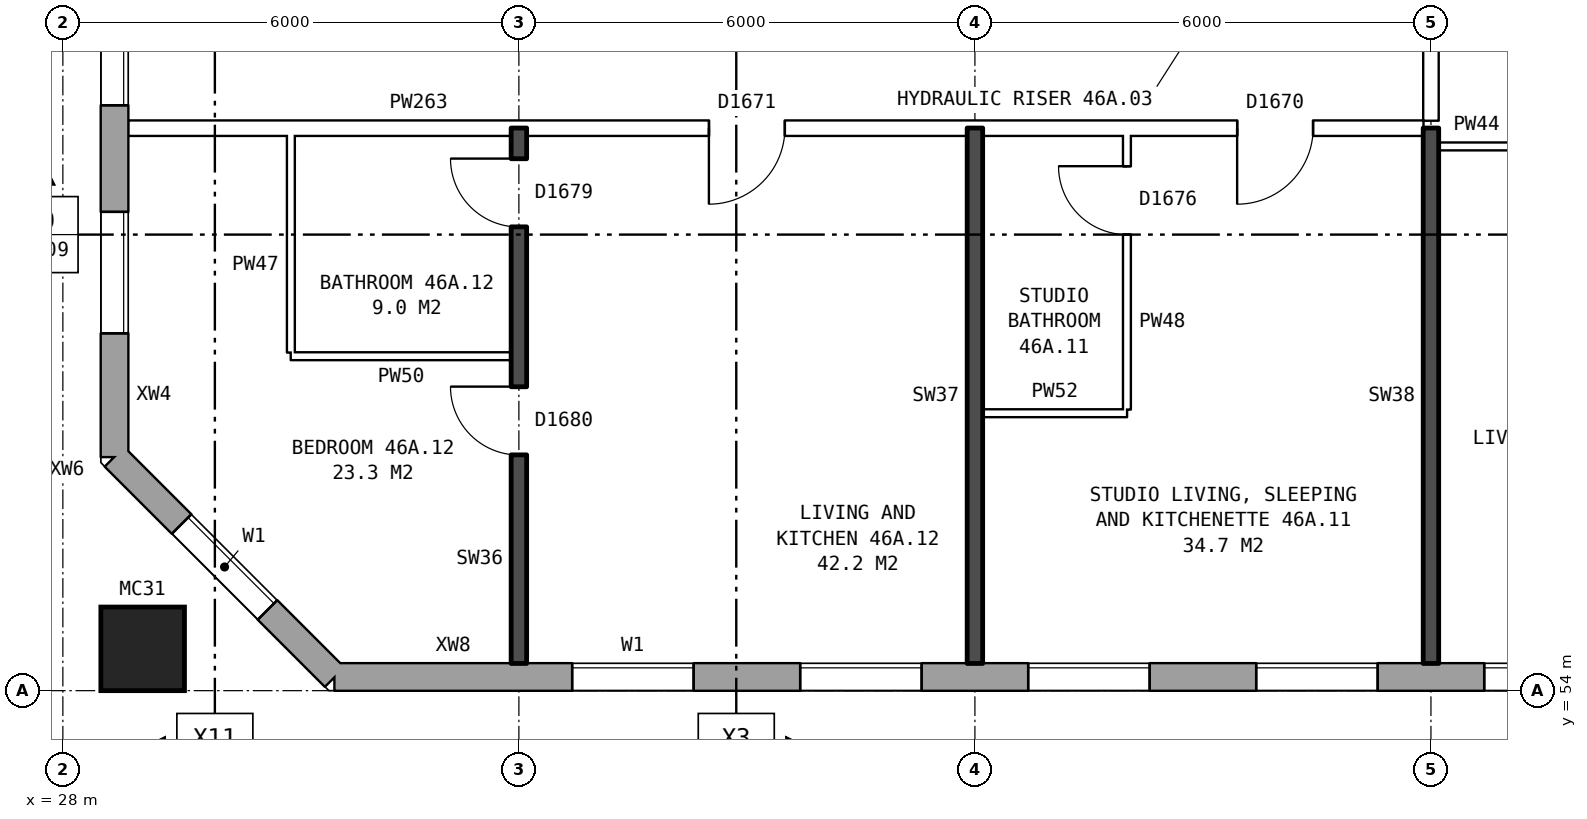
"""IFC4 building model, lengths in metres.
Left out: names, types, materials, properties, quantities, classifications, styles, units other than length and angle.
Written with IfcOpenShell. Run it as: python <this file> out.ifc"""

import sys

from ifc_helpers import new_model, si_unit, direction, frame, frame_2d, origin, origin_2d, place, context, subcontext, project, spatial, rectangle, hollow_rectangle, extrude, element, fill, save


model = new_model("IFC4")
c1 = context("Model", 3, precision=1e-05, world=origin(), true_north=direction((0.0, 1.0)))
c2 = subcontext(c1, "Body", "Model", "MODEL_VIEW")
j1 = project(units=[si_unit("LENGTHUNIT", "METRE"), si_unit("PLANEANGLEUNIT", "RADIAN")], contexts=[c1])
p1 = place(None, origin())
s1 = spatial("IfcSite", under=j1, at=p1, CompositionType="ELEMENT")
p2 = place(p1, origin())
s2 = spatial("IfcBuilding", under=s1, at=p2, CompositionType="ELEMENT")
p3 = place(p2, frame((0.0, 0.0, 164.0)))
s3 = spatial("IfcBuildingStorey", under=s2, at=p3, CompositionType="ELEMENT", Elevation=164.0)
p4 = place(p3, frame((29.05, 54.55, 0.0), z_axis=(0.0, 0.0, 1.0), x_axis=(1.0, 0.0, 0.0)))
e1 = element("IfcColumn", 1, at=p4, inside=s3, PredefinedType="COLUMN", context=c2, shape_type="SweptSolid", body=[
    extrude(hollow_rectangle(XDim=1.1, YDim=1.1, WallThickness=0.06, at=origin_2d()), origin(), (0.0, 0.0, 1.0), 3.1),
])
p5 = place(p3, frame((28.68, 57.075, 0.0), z_axis=(0.0, 0.0, 1.0), x_axis=(0.707106781187, -0.707106781187, 0.0)))
e2 = element("IfcWall", 2, at=p5, inside=s3, PredefinedType="STANDARD", context=c2, shape_type="SweptSolid", body=[
    extrude(rectangle(XDim=4.094, YDim=0.36, at=frame_2d((2.047, 0.0))), origin(), (0.0, 0.0, 1.0), 2.85),
])
p6 = place(p5, frame((1.247, 0.0, 0.8)))
e3 = element("IfcOpeningElement", 3, at=p6, cuts=e2, PredefinedType="OPENING", context=c2, shape_type="SweptSolid", body=[
    extrude(rectangle(XDim=1.6, YDim=1.8, at=frame_2d((0.8, 0.9))), frame((0.0, 0.19, 0.0), z_axis=(0.0, -1.0, 0.0), x_axis=(1.0, 0.0, 0.0)), (0.0, 0.0, 1.0), 0.38),
])
p7 = place(p3, frame((31.575, 54.18, 0.0), z_axis=(0.0, 0.0, 1.0), x_axis=(1.0, 0.0, 0.0)))
e4 = element("IfcWall", 4, at=p7, inside=s3, PredefinedType="STANDARD", context=c2, shape_type="SweptSolid", body=[
    extrude(rectangle(XDim=41.351, YDim=0.36, at=frame_2d((20.675, 0.0))), origin(), (0.0, 0.0, 1.0), 2.85),
])
p8 = place(p7, frame((3.125, 0.0, 0.8)))
e5 = element("IfcOpeningElement", 5, at=p8, cuts=e4, PredefinedType="OPENING", context=c2, shape_type="SweptSolid", body=[
    extrude(rectangle(XDim=1.6, YDim=1.8, at=frame_2d((0.8, 0.9))), frame((0.0, 0.19, 0.0), z_axis=(0.0, -1.0, 0.0), x_axis=(1.0, 0.0, 0.0)), (0.0, 0.0, 1.0), 0.38),
])
p9 = place(p7, frame((6.125, 0.0, 0.8)))
e6 = element("IfcOpeningElement", 6, at=p9, cuts=e4, PredefinedType="OPENING", context=c2, shape_type="SweptSolid", body=[
    extrude(rectangle(XDim=1.6, YDim=1.8, at=frame_2d((0.8, 0.9))), frame((0.0, 0.19, 0.0), z_axis=(0.0, -1.0, 0.0), x_axis=(1.0, 0.0, 0.0)), (0.0, 0.0, 1.0), 0.38),
])
p10 = place(p7, frame((9.125, 0.0, 0.8)))
e7 = element("IfcOpeningElement", 7, at=p10, cuts=e4, PredefinedType="OPENING", context=c2, shape_type="SweptSolid", body=[
    extrude(rectangle(XDim=1.6, YDim=1.8, at=frame_2d((0.8, 0.9))), frame((0.0, 0.19, 0.0), z_axis=(0.0, -1.0, 0.0), x_axis=(1.0, 0.0, 0.0)), (0.0, 0.0, 1.0), 0.38),
])
p11 = place(p7, frame((12.125, 0.0, 0.8)))
e8 = element("IfcOpeningElement", 8, at=p11, cuts=e4, PredefinedType="OPENING", context=c2, shape_type="SweptSolid", body=[
    extrude(rectangle(XDim=1.6, YDim=1.8, at=frame_2d((0.8, 0.9))), frame((0.0, 0.19, 0.0), z_axis=(0.0, -1.0, 0.0), x_axis=(1.0, 0.0, 0.0)), (0.0, 0.0, 1.0), 0.38),
])
p12 = place(p7, frame((15.125, 0.0, 0.8)))
e9 = element("IfcOpeningElement", 9, at=p12, cuts=e4, PredefinedType="OPENING", context=c2, shape_type="SweptSolid", body=[
    extrude(rectangle(XDim=1.6, YDim=1.8, at=frame_2d((0.8, 0.9))), frame((0.0, 0.19, 0.0), z_axis=(0.0, -1.0, 0.0), x_axis=(1.0, 0.0, 0.0)), (0.0, 0.0, 1.0), 0.38),
])
p13 = place(p7, frame((17.575, 0.0, 1.55)))
e10 = element("IfcOpeningElement", 10, at=p13, cuts=e4, PredefinedType="OPENING", context=c2, shape_type="SweptSolid", body=[
    extrude(rectangle(XDim=1.0, YDim=0.9, at=frame_2d((0.5, 0.45))), frame((0.0, 0.19, 0.0), z_axis=(0.0, -1.0, 0.0), x_axis=(1.0, 0.0, 0.0)), (0.0, 0.0, 1.0), 0.38),
])
p14 = place(p7, frame((20.625, 0.0, 0.25)))
e11 = element("IfcOpeningElement", 11, at=p14, cuts=e4, PredefinedType="OPENING", context=c2, shape_type="SweptSolid", body=[
    extrude(rectangle(XDim=0.6, YDim=1.5, at=frame_2d((0.3, 0.75))), frame((0.0, 0.19, 0.0), z_axis=(0.0, -1.0, 0.0), x_axis=(1.0, 0.0, 0.0)), (0.0, 0.0, 1.0), 0.38),
])
p15 = place(p7, frame((24.125, 0.0, 0.8)))
e12 = element("IfcOpeningElement", 12, at=p15, cuts=e4, PredefinedType="OPENING", context=c2, shape_type="SweptSolid", body=[
    extrude(rectangle(XDim=1.6, YDim=1.8, at=frame_2d((0.8, 0.9))), frame((0.0, 0.19, 0.0), z_axis=(0.0, -1.0, 0.0), x_axis=(1.0, 0.0, 0.0)), (0.0, 0.0, 1.0), 0.38),
])
p16 = place(p7, frame((27.125, 0.0, 0.8)))
e13 = element("IfcOpeningElement", 13, at=p16, cuts=e4, PredefinedType="OPENING", context=c2, shape_type="SweptSolid", body=[
    extrude(rectangle(XDim=1.6, YDim=1.8, at=frame_2d((0.8, 0.9))), frame((0.0, 0.19, 0.0), z_axis=(0.0, -1.0, 0.0), x_axis=(1.0, 0.0, 0.0)), (0.0, 0.0, 1.0), 0.38),
])
p17 = place(p7, frame((30.125, 0.0, 0.8)))
e14 = element("IfcOpeningElement", 14, at=p17, cuts=e4, PredefinedType="OPENING", context=c2, shape_type="SweptSolid", body=[
    extrude(rectangle(XDim=1.6, YDim=1.8, at=frame_2d((0.8, 0.9))), frame((0.0, 0.19, 0.0), z_axis=(0.0, -1.0, 0.0), x_axis=(1.0, 0.0, 0.0)), (0.0, 0.0, 1.0), 0.38),
])
p18 = place(p7, frame((33.125, 0.0, 0.8)))
e15 = element("IfcOpeningElement", 15, at=p18, cuts=e4, PredefinedType="OPENING", context=c2, shape_type="SweptSolid", body=[
    extrude(rectangle(XDim=1.6, YDim=1.8, at=frame_2d((0.8, 0.9))), frame((0.0, 0.19, 0.0), z_axis=(0.0, -1.0, 0.0), x_axis=(1.0, 0.0, 0.0)), (0.0, 0.0, 1.0), 0.38),
])
p19 = place(p7, frame((36.125, 0.0, 0.8)))
e16 = element("IfcOpeningElement", 16, at=p19, cuts=e4, PredefinedType="OPENING", context=c2, shape_type="SweptSolid", body=[
    extrude(rectangle(XDim=1.6, YDim=1.8, at=frame_2d((0.8, 0.9))), frame((0.0, 0.19, 0.0), z_axis=(0.0, -1.0, 0.0), x_axis=(1.0, 0.0, 0.0)), (0.0, 0.0, 1.0), 0.38),
])
p20 = place(p7, frame((39.125, 0.0, 0.8)))
e17 = element("IfcOpeningElement", 17, at=p20, cuts=e4, PredefinedType="OPENING", context=c2, shape_type="SweptSolid", body=[
    extrude(rectangle(XDim=1.6, YDim=1.8, at=frame_2d((0.8, 0.9))), frame((0.0, 0.19, 0.0), z_axis=(0.0, -1.0, 0.0), x_axis=(1.0, 0.0, 0.0)), (0.0, 0.0, 1.0), 0.38),
])
p21 = place(p7, frame((19.225, 0.0, 0.15)))
e18 = element("IfcOpeningElement", 18, at=p21, cuts=e4, PredefinedType="OPENING", context=c2, shape_type="SweptSolid", body=[
    extrude(rectangle(XDim=1.0, YDim=0.9, at=frame_2d((0.5, 0.45))), frame((0.0, 0.19, 0.0), z_axis=(0.0, -1.0, 0.0), x_axis=(1.0, 0.0, 0.0)), (0.0, 0.0, 1.0), 0.38),
])
p22 = place(p7, frame((21.525, 0.0, 0.15)))
e19 = element("IfcOpeningElement", 19, at=p22, cuts=e4, PredefinedType="OPENING", context=c2, shape_type="SweptSolid", body=[
    extrude(rectangle(XDim=0.6, YDim=0.9, at=frame_2d((0.3, 0.45))), frame((0.0, 0.19, 0.0), z_axis=(0.0, -1.0, 0.0), x_axis=(1.0, 0.0, 0.0)), (0.0, 0.0, 1.0), 0.38),
])
p23 = place(p7, frame((22.625, 0.0, 1.65)))
e20 = element("IfcOpeningElement", 20, at=p23, cuts=e4, PredefinedType="OPENING", context=c2, shape_type="SweptSolid", body=[
    extrude(rectangle(XDim=0.6, YDim=0.9, at=frame_2d((0.3, 0.45))), frame((0.0, 0.19, 0.0), z_axis=(0.0, -1.0, 0.0), x_axis=(1.0, 0.0, 0.0)), (0.0, 0.0, 1.0), 0.38),
])
p24 = place(p3, frame((28.68, 82.925, 0.0), z_axis=(0.0, 0.0, 1.0), x_axis=(0.0, -1.0, 0.0)))
e21 = element("IfcWall", 21, at=p24, inside=s3, PredefinedType="STANDARD", context=c2, shape_type="SweptSolid", body=[
    extrude(rectangle(XDim=25.851, YDim=0.36, at=frame_2d((12.925, 0.0))), origin(), (0.0, 0.0, 1.0), 2.85),
])
p25 = place(p24, frame((1.625, 0.0, 0.8)))
e22 = element("IfcOpeningElement", 22, at=p25, cuts=e21, PredefinedType="OPENING", context=c2, shape_type="SweptSolid", body=[
    extrude(rectangle(XDim=1.6, YDim=1.8, at=frame_2d((0.8, 0.9))), frame((0.0, 0.19, 0.0), z_axis=(0.0, -1.0, 0.0), x_axis=(1.0, 0.0, 0.0)), (0.0, 0.0, 1.0), 0.38),
])
p26 = place(p24, frame((4.625, 0.0, 0.8)))
e23 = element("IfcOpeningElement", 23, at=p26, cuts=e21, PredefinedType="OPENING", context=c2, shape_type="SweptSolid", body=[
    extrude(rectangle(XDim=1.6, YDim=1.8, at=frame_2d((0.8, 0.9))), frame((0.0, 0.19, 0.0), z_axis=(0.0, -1.0, 0.0), x_axis=(1.0, 0.0, 0.0)), (0.0, 0.0, 1.0), 0.38),
])
p27 = place(p24, frame((7.625, 0.0, 0.8)))
e24 = element("IfcOpeningElement", 24, at=p27, cuts=e21, PredefinedType="OPENING", context=c2, shape_type="SweptSolid", body=[
    extrude(rectangle(XDim=1.6, YDim=1.8, at=frame_2d((0.8, 0.9))), frame((0.0, 0.19, 0.0), z_axis=(0.0, -1.0, 0.0), x_axis=(1.0, 0.0, 0.0)), (0.0, 0.0, 1.0), 0.38),
])
p28 = place(p24, frame((10.625, 0.0, 0.8)))
e25 = element("IfcOpeningElement", 25, at=p28, cuts=e21, PredefinedType="OPENING", context=c2, shape_type="SweptSolid", body=[
    extrude(rectangle(XDim=1.6, YDim=1.8, at=frame_2d((0.8, 0.9))), frame((0.0, 0.19, 0.0), z_axis=(0.0, -1.0, 0.0), x_axis=(1.0, 0.0, 0.0)), (0.0, 0.0, 1.0), 0.38),
])
p29 = place(p24, frame((13.625, 0.0, 0.8)))
e26 = element("IfcOpeningElement", 26, at=p29, cuts=e21, PredefinedType="OPENING", context=c2, shape_type="SweptSolid", body=[
    extrude(rectangle(XDim=1.6, YDim=1.8, at=frame_2d((0.8, 0.9))), frame((0.0, 0.19, 0.0), z_axis=(0.0, -1.0, 0.0), x_axis=(1.0, 0.0, 0.0)), (0.0, 0.0, 1.0), 0.38),
])
p30 = place(p24, frame((16.625, 0.0, 0.8)))
e27 = element("IfcOpeningElement", 27, at=p30, cuts=e21, PredefinedType="OPENING", context=c2, shape_type="SweptSolid", body=[
    extrude(rectangle(XDim=1.6, YDim=1.8, at=frame_2d((0.8, 0.9))), frame((0.0, 0.19, 0.0), z_axis=(0.0, -1.0, 0.0), x_axis=(1.0, 0.0, 0.0)), (0.0, 0.0, 1.0), 0.38),
])
p31 = place(p24, frame((19.625, 0.0, 0.8)))
e28 = element("IfcOpeningElement", 28, at=p31, cuts=e21, PredefinedType="OPENING", context=c2, shape_type="SweptSolid", body=[
    extrude(rectangle(XDim=1.6, YDim=1.8, at=frame_2d((0.8, 0.9))), frame((0.0, 0.19, 0.0), z_axis=(0.0, -1.0, 0.0), x_axis=(1.0, 0.0, 0.0)), (0.0, 0.0, 1.0), 0.38),
])
p32 = place(p24, frame((22.625, 0.0, 0.8)))
e29 = element("IfcOpeningElement", 29, at=p32, cuts=e21, PredefinedType="OPENING", context=c2, shape_type="SweptSolid", body=[
    extrude(rectangle(XDim=1.6, YDim=1.8, at=frame_2d((0.8, 0.9))), frame((0.0, 0.19, 0.0), z_axis=(0.0, -1.0, 0.0), x_axis=(1.0, 0.0, 0.0)), (0.0, 0.0, 1.0), 0.38),
])
p33 = place(p3, frame((40.1, 57.65, 0.0), z_axis=(0.0, 0.0, 1.0), x_axis=(1.0, 0.0, 0.0)))
e30 = element("IfcWall", 30, at=p33, inside=s3, PredefinedType="PARTITIONING", context=c2, shape_type="SweptSolid", body=[
    extrude(rectangle(XDim=1.9, YDim=0.1, at=frame_2d((0.95, 0.0))), origin(), (0.0, 0.0, 1.0), 2.85),
])
p34 = place(p3, frame((31.0, 58.4, 0.0), z_axis=(0.0, 0.0, 1.0), x_axis=(1.0, 0.0, 0.0)))
e31 = element("IfcWall", 31, at=p34, inside=s3, PredefinedType="PARTITIONING", context=c2, shape_type="SweptSolid", body=[
    extrude(rectangle(XDim=2.9, YDim=0.1, at=frame_2d((1.45, 0.0))), origin(), (0.0, 0.0, 1.0), 2.85),
])
p35 = place(p3, frame((46.1, 61.16, 0.0), z_axis=(0.0, 0.0, 1.0), x_axis=(1.0, 0.0, 0.0)))
e32 = element("IfcWall", 32, at=p35, inside=s3, PredefinedType="PARTITIONING", context=c2, shape_type="SweptSolid", body=[
    extrude(rectangle(XDim=2.9, YDim=0.1, at=frame_2d((1.45, 0.0))), origin(), (0.0, 0.0, 1.0), 2.85),
])
p36 = place(p35, frame((1.0, 0.0, 0.0)))
e33 = element("IfcOpeningElement", 33, at=p36, cuts=e32, PredefinedType="OPENING", context=c2, shape_type="SweptSolid", body=[
    extrude(rectangle(XDim=0.9, YDim=2.1, at=frame_2d((0.45, 1.05))), frame((0.0, 0.06, 0.0), z_axis=(0.0, -1.0, 0.0), x_axis=(1.0, 0.0, 0.0)), (0.0, 0.0, 1.0), 0.12),
])
p37 = place(p3, frame((28.86, 61.4, 0.0), z_axis=(0.0, 0.0, 1.0), x_axis=(1.0, 0.0, 0.0)))
e34 = element("IfcWall", 34, at=p37, inside=s3, PredefinedType="PARTITIONING", context=c2, shape_type="SweptSolid", body=[
    extrude(rectangle(XDim=17.04, YDim=0.2, at=frame_2d((8.52, 0.0))), origin(), (0.0, 0.0, 1.0), 2.85),
])
p38 = place(p37, frame((14.59, 0.0, 0.0)))
e35 = element("IfcOpeningElement", 35, at=p38, cuts=e34, PredefinedType="OPENING", context=c2, shape_type="SweptSolid", body=[
    extrude(rectangle(XDim=1.0, YDim=2.1, at=frame_2d((0.5, 1.05))), frame((0.0, 0.11, 0.0), z_axis=(0.0, -1.0, 0.0), x_axis=(1.0, 0.0, 0.0)), (0.0, 0.0, 1.0), 0.22),
])
p39 = place(p37, frame((7.64, 0.0, 0.0)))
e36 = element("IfcOpeningElement", 36, at=p39, cuts=e34, PredefinedType="OPENING", context=c2, shape_type="SweptSolid", body=[
    extrude(rectangle(XDim=1.0, YDim=2.1, at=frame_2d((0.5, 1.05))), frame((0.0, 0.11, 0.0), z_axis=(0.0, -1.0, 0.0), x_axis=(1.0, 0.0, 0.0)), (0.0, 0.0, 1.0), 0.22),
])
p40 = place(p3, frame((31.0, 58.45, 0.0), z_axis=(0.0, 0.0, 1.0), x_axis=(0.0, 1.0, 0.0)))
e37 = element("IfcWall", 37, at=p40, inside=s3, PredefinedType="PARTITIONING", context=c2, shape_type="SweptSolid", body=[
    extrude(rectangle(XDim=2.85, YDim=0.1, at=frame_2d((1.425, 0.0))), origin(), (0.0, 0.0, 1.0), 2.85),
])
p41 = place(p3, frame((34.0, 54.36, 0.0), z_axis=(0.0, 0.0, 1.0), x_axis=(0.0, 1.0, 0.0)))
e38 = element("IfcWall", 38, at=p41, inside=s3, PredefinedType="SOLIDWALL", context=c2, shape_type="SweptSolid", body=[
    extrude(rectangle(XDim=7.04, YDim=0.2, at=frame_2d((3.52, 0.0))), origin(), (0.0, 0.0, 1.0), 2.85),
])
p42 = place(p41, frame((2.74, 0.0, 0.0)))
e39 = element("IfcOpeningElement", 39, at=p42, cuts=e38, PredefinedType="OPENING", context=c2, shape_type="SweptSolid", body=[
    extrude(rectangle(XDim=0.9, YDim=2.1, at=frame_2d((0.45, 1.05))), frame((0.0, 0.11, 0.0), z_axis=(0.0, -1.0, 0.0), x_axis=(1.0, 0.0, 0.0)), (0.0, 0.0, 1.0), 0.22),
])
p43 = place(p41, frame((5.74, 0.0, 0.0)))
e40 = element("IfcOpeningElement", 40, at=p43, cuts=e38, PredefinedType="OPENING", context=c2, shape_type="SweptSolid", body=[
    extrude(rectangle(XDim=0.9, YDim=2.1, at=frame_2d((0.45, 1.05))), frame((0.0, 0.11, 0.0), z_axis=(0.0, -1.0, 0.0), x_axis=(1.0, 0.0, 0.0)), (0.0, 0.0, 1.0), 0.22),
])
p44 = place(p3, frame((40.0, 54.36, 0.0), z_axis=(0.0, 0.0, 1.0), x_axis=(0.0, 1.0, 0.0)))
e41 = element("IfcWall", 41, at=p44, inside=s3, PredefinedType="SOLIDWALL", context=c2, shape_type="SweptSolid", body=[
    extrude(rectangle(XDim=7.04, YDim=0.2, at=frame_2d((3.52, 0.0))), origin(), (0.0, 0.0, 1.0), 2.85),
])
p45 = place(p3, frame((42.0, 57.7, 0.0), z_axis=(0.0, 0.0, 1.0), x_axis=(0.0, 1.0, 0.0)))
e42 = element("IfcWall", 42, at=p45, inside=s3, PredefinedType="PARTITIONING", context=c2, shape_type="SweptSolid", body=[
    extrude(rectangle(XDim=3.6, YDim=0.1, at=frame_2d((1.8, 0.0))), origin(), (0.0, 0.0, 1.0), 2.85),
])
p46 = place(p45, frame((2.3, 0.0, 0.0)))
e43 = element("IfcOpeningElement", 43, at=p46, cuts=e42, PredefinedType="OPENING", context=c2, shape_type="SweptSolid", body=[
    extrude(rectangle(XDim=0.9, YDim=2.1, at=frame_2d((0.45, 1.05))), frame((0.0, 0.06, 0.0), z_axis=(0.0, -1.0, 0.0), x_axis=(1.0, 0.0, 0.0)), (0.0, 0.0, 1.0), 0.12),
])
p47 = place(p3, frame((46.0, 54.36, 0.0), z_axis=(0.0, 0.0, 1.0), x_axis=(0.0, 1.0, 0.0)))
e44 = element("IfcWall", 44, at=p47, inside=s3, PredefinedType="SOLIDWALL", context=c2, shape_type="SweptSolid", body=[
    extrude(rectangle(XDim=7.04, YDim=0.2, at=frame_2d((3.52, 0.0))), origin(), (0.0, 0.0, 1.0), 2.85),
])
p48 = place(p3, frame((46.0, 61.5, 0.0), z_axis=(0.0, 0.0, 1.0), x_axis=(0.0, 1.0, 0.0)))
e45 = element("IfcWall", 45, at=p48, inside=s3, PredefinedType="PARTITIONING", context=c2, shape_type="SweptSolid", body=[
    extrude(rectangle(XDim=2.2, YDim=0.2, at=frame_2d((1.1, 0.0))), origin(), (0.0, 0.0, 1.0), 2.85),
])
p49 = place(p6, origin())
e46 = element("IfcWindow", 46, at=p49, inside=s3, PartitioningType="SINGLE_PANEL", PredefinedType="WINDOW", context=c2, shape_type="SweptSolid", body=[
    extrude(rectangle(XDim=1.6, YDim=1.8, at=frame_2d((0.8, 0.9))), frame((0.0, 0.15, 0.0), z_axis=(0.0, -1.0, 0.0), x_axis=(1.0, 0.0, 0.0)), (0.0, 0.0, 1.0), 0.06),
])
fill(e3, e46)
p50 = place(p8, origin())
e47 = element("IfcWindow", 47, at=p50, inside=s3, PartitioningType="SINGLE_PANEL", PredefinedType="WINDOW", context=c2, shape_type="SweptSolid", body=[
    extrude(rectangle(XDim=1.6, YDim=1.8, at=frame_2d((0.8, 0.9))), frame((0.0, 0.15, 0.0), z_axis=(0.0, -1.0, 0.0), x_axis=(1.0, 0.0, 0.0)), (0.0, 0.0, 1.0), 0.06),
])
fill(e5, e47)
p51 = place(p9, origin())
e48 = element("IfcWindow", 48, at=p51, inside=s3, PartitioningType="SINGLE_PANEL", PredefinedType="WINDOW", context=c2, shape_type="SweptSolid", body=[
    extrude(rectangle(XDim=1.6, YDim=1.8, at=frame_2d((0.8, 0.9))), frame((0.0, 0.15, 0.0), z_axis=(0.0, -1.0, 0.0), x_axis=(1.0, 0.0, 0.0)), (0.0, 0.0, 1.0), 0.06),
])
fill(e6, e48)
p52 = place(p10, origin())
e49 = element("IfcWindow", 49, at=p52, inside=s3, PartitioningType="SINGLE_PANEL", PredefinedType="WINDOW", context=c2, shape_type="SweptSolid", body=[
    extrude(rectangle(XDim=1.6, YDim=1.8, at=frame_2d((0.8, 0.9))), frame((0.0, 0.15, 0.0), z_axis=(0.0, -1.0, 0.0), x_axis=(1.0, 0.0, 0.0)), (0.0, 0.0, 1.0), 0.06),
])
fill(e7, e49)
p53 = place(p11, origin())
e50 = element("IfcWindow", 50, at=p53, inside=s3, PartitioningType="SINGLE_PANEL", PredefinedType="WINDOW", context=c2, shape_type="SweptSolid", body=[
    extrude(rectangle(XDim=1.6, YDim=1.8, at=frame_2d((0.8, 0.9))), frame((0.0, 0.15, 0.0), z_axis=(0.0, -1.0, 0.0), x_axis=(1.0, 0.0, 0.0)), (0.0, 0.0, 1.0), 0.06),
])
fill(e8, e50)
p54 = place(p12, origin())
e51 = element("IfcWindow", 51, at=p54, inside=s3, PartitioningType="SINGLE_PANEL", PredefinedType="WINDOW", context=c2, shape_type="SweptSolid", body=[
    extrude(rectangle(XDim=1.6, YDim=1.8, at=frame_2d((0.8, 0.9))), frame((0.0, 0.15, 0.0), z_axis=(0.0, -1.0, 0.0), x_axis=(1.0, 0.0, 0.0)), (0.0, 0.0, 1.0), 0.06),
])
fill(e9, e51)
p55 = place(p31, origin())
e52 = element("IfcWindow", 52, at=p55, inside=s3, PartitioningType="SINGLE_PANEL", PredefinedType="WINDOW", context=c2, shape_type="SweptSolid", body=[
    extrude(rectangle(XDim=1.6, YDim=1.8, at=frame_2d((0.8, 0.9))), frame((0.0, 0.15, 0.0), z_axis=(0.0, -1.0, 0.0), x_axis=(1.0, 0.0, 0.0)), (0.0, 0.0, 1.0), 0.06),
])
fill(e28, e52)
p56 = place(p32, origin())
e53 = element("IfcWindow", 53, at=p56, inside=s3, PartitioningType="SINGLE_PANEL", PredefinedType="WINDOW", context=c2, shape_type="SweptSolid", body=[
    extrude(rectangle(XDim=1.6, YDim=1.8, at=frame_2d((0.8, 0.9))), frame((0.0, 0.15, 0.0), z_axis=(0.0, -1.0, 0.0), x_axis=(1.0, 0.0, 0.0)), (0.0, 0.0, 1.0), 0.06),
])
fill(e29, e53)
p57 = place(p38, frame((1.0, 0.0, 0.0), z_axis=(0.0, 0.0, 1.0), x_axis=(-1.0, 0.0, 0.0)))
e54 = element("IfcDoor", 54, at=p57, inside=s3, OperationType="SINGLE_SWING_RIGHT", PredefinedType="DOOR", context=c2, shape_type="SweptSolid", body=[
    extrude(rectangle(XDim=1.0, YDim=2.1, at=frame_2d((0.5, 1.05))), frame((0.0, 0.025, 0.0), z_axis=(0.0, -1.0, 0.0), x_axis=(1.0, 0.0, 0.0)), (0.0, 0.0, 1.0), 0.05),
])
fill(e35, e54)
p58 = place(p46, origin())
e55 = element("IfcDoor", 55, at=p58, inside=s3, OperationType="SINGLE_SWING_RIGHT", PredefinedType="DOOR", context=c2, shape_type="SweptSolid", body=[
    extrude(rectangle(XDim=0.9, YDim=2.1, at=frame_2d((0.45, 1.05))), frame((0.0, 0.025, 0.0), z_axis=(0.0, -1.0, 0.0), x_axis=(1.0, 0.0, 0.0)), (0.0, 0.0, 1.0), 0.05),
])
fill(e43, e55)
p59 = place(p42, origin())
e56 = element("IfcDoor", 56, at=p59, inside=s3, OperationType="SINGLE_SWING_RIGHT", PredefinedType="DOOR", context=c2, shape_type="SweptSolid", body=[
    extrude(rectangle(XDim=0.9, YDim=2.1, at=frame_2d((0.45, 1.05))), frame((0.0, 0.025, 0.0), z_axis=(0.0, -1.0, 0.0), x_axis=(1.0, 0.0, 0.0)), (0.0, 0.0, 1.0), 0.05),
])
fill(e39, e56)
p60 = place(p39, frame((1.0, 0.0, 0.0), z_axis=(0.0, 0.0, 1.0), x_axis=(-1.0, 0.0, 0.0)))
e57 = element("IfcDoor", 57, at=p60, inside=s3, OperationType="SINGLE_SWING_RIGHT", PredefinedType="DOOR", context=c2, shape_type="SweptSolid", body=[
    extrude(rectangle(XDim=1.0, YDim=2.1, at=frame_2d((0.5, 1.05))), frame((0.0, 0.025, 0.0), z_axis=(0.0, -1.0, 0.0), x_axis=(1.0, 0.0, 0.0)), (0.0, 0.0, 1.0), 0.05),
])
fill(e36, e57)
p61 = place(p43, origin())
e58 = element("IfcDoor", 58, at=p61, inside=s3, OperationType="SINGLE_SWING_RIGHT", PredefinedType="DOOR", context=c2, shape_type="SweptSolid", body=[
    extrude(rectangle(XDim=0.9, YDim=2.1, at=frame_2d((0.45, 1.05))), frame((0.0, 0.025, 0.0), z_axis=(0.0, -1.0, 0.0), x_axis=(1.0, 0.0, 0.0)), (0.0, 0.0, 1.0), 0.05),
])
fill(e40, e58)
save(model, sys.argv[1])
